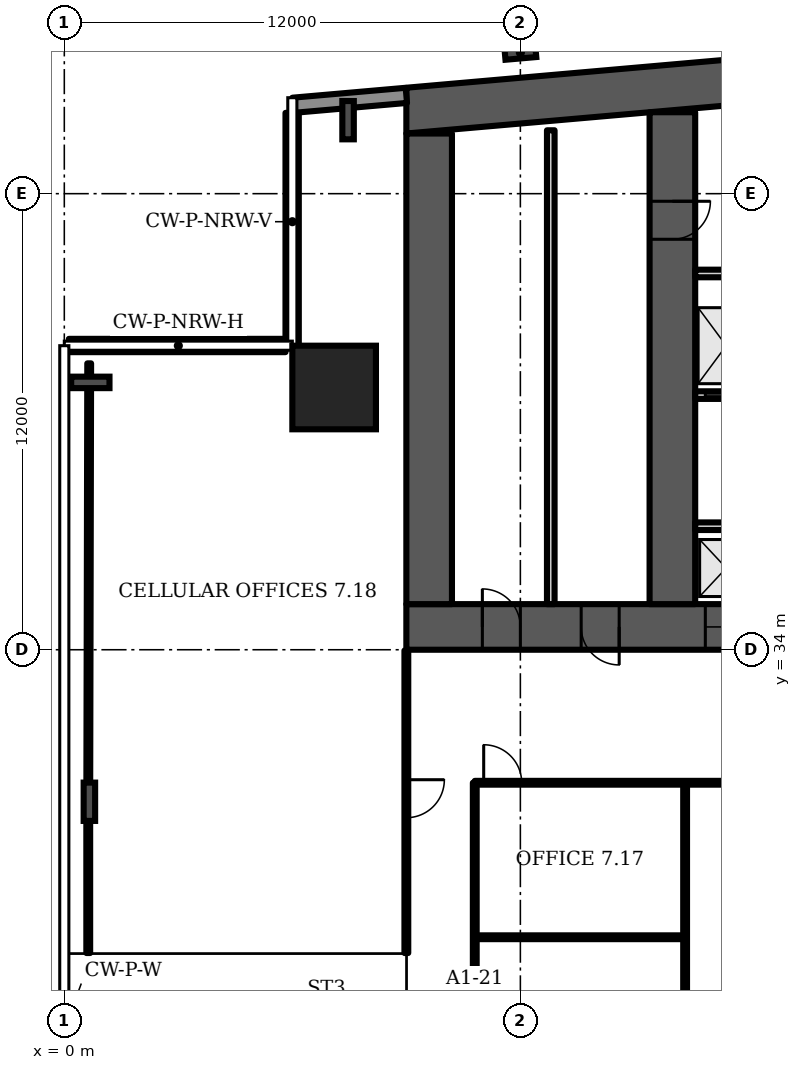
"""IFC4 building model, lengths in metres.
Left out: names, types, materials, properties, quantities, classifications, styles, units other than length and angle.
Written with IfcOpenShell. Run it as: python <this file> out.ifc"""

import sys

from ifc_helpers import new_model, si_unit, direction, frame, frame_2d, origin, origin_2d, place, context, subcontext, project, spatial, polyline, rectangle, i_section, outline, extrude, element, fill, save


model = new_model("IFC4")
c1 = context("Model", 3, precision=1e-05, world=origin(), true_north=direction((0.0, 1.0)))
c2 = subcontext(c1, "Body", "Model", "MODEL_VIEW")
j1 = project(units=[si_unit("LENGTHUNIT", "METRE"), si_unit("PLANEANGLEUNIT", "RADIAN")], contexts=[c1])
p1 = place(None, origin())
s1 = spatial("IfcSite", under=j1, at=p1, CompositionType="ELEMENT")
p2 = place(p1, origin())
s2 = spatial("IfcBuilding", under=s1, at=p2, CompositionType="ELEMENT")
p3 = place(p2, frame((0.0, 0.0, 45.1)))
s3 = spatial("IfcBuildingStorey", under=s2, at=p3, CompositionType="ELEMENT", Elevation=45.1)
p4 = place(p3, frame((0.0, 0.0, -0.0)))
e1 = element("IfcWall", 1, at=p4, inside=s3, PredefinedType="SHEAR", context=c2, shape_type="SweptSolid", body=[
    extrude(outline(polyline([(9.0, 47.583), (37.0, 50.032), (65.0, 47.583), (65.0, 48.787), (37.0, 51.237), (9.0, 48.787), (9.0, 47.583)])), origin(), (0.0, 0.0, 1.0), 3.6),
])
p5 = place(p3, frame((9.0, 34.6, 0.0), z_axis=(0.0, 0.0, 1.0), x_axis=(1.0, 0.0, 0.0)))
e2 = element("IfcWall", 2, at=p5, inside=s3, PredefinedType="SHEAR", context=c2, shape_type="SweptSolid", body=[
    extrude(rectangle(XDim=56.0, YDim=1.2, at=frame_2d((28.0, 0.0))), origin(), (0.0, 0.0, 1.0), 3.6),
])
p6 = place(p5, frame((2.0, 0.0, 0.0)))
e3 = element("IfcOpeningElement", 3, at=p6, cuts=e2, PredefinedType="OPENING", context=c2, shape_type="SweptSolid", body=[
    extrude(rectangle(XDim=1.0, YDim=2.1, at=frame_2d((0.5, 1.05))), frame((0.0, 0.61, 0.0), z_axis=(0.0, -1.0, 0.0), x_axis=(1.0, 0.0, 0.0)), (0.0, 0.0, 1.0), 1.22),
])
p7 = place(p5, frame((4.6, 0.0, 0.0)))
e4 = element("IfcOpeningElement", 4, at=p7, cuts=e2, PredefinedType="OPENING", context=c2, shape_type="SweptSolid", body=[
    extrude(rectangle(XDim=1.0, YDim=2.1, at=frame_2d((0.5, 1.05))), frame((0.0, 0.61, 0.0), z_axis=(0.0, -1.0, 0.0), x_axis=(1.0, 0.0, 0.0)), (0.0, 0.0, 1.0), 1.22),
])
p8 = place(p5, frame((7.867, 0.0, 0.0)))
e5 = element("IfcOpeningElement", 5, at=p8, cuts=e2, PredefinedType="OPENING", context=c2, shape_type="SweptSolid", body=[
    extrude(rectangle(XDim=1.1, YDim=2.1, at=frame_2d((0.55, 1.05))), frame((0.0, 0.61, 0.0), z_axis=(0.0, -1.0, 0.0), x_axis=(1.0, 0.0, 0.0)), (0.0, 0.0, 1.0), 1.22),
])
p9 = place(p5, frame((12.033, 0.0, 0.0)))
e6 = element("IfcOpeningElement", 6, at=p9, cuts=e2, PredefinedType="OPENING", context=c2, shape_type="SweptSolid", body=[
    extrude(rectangle(XDim=1.1, YDim=2.1, at=frame_2d((0.55, 1.05))), frame((0.0, 0.61, 0.0), z_axis=(0.0, -1.0, 0.0), x_axis=(1.0, 0.0, 0.0)), (0.0, 0.0, 1.0), 1.22),
])
p10 = place(p5, frame((9.8, 0.0, 0.0)))
e7 = element("IfcOpeningElement", 7, at=p10, cuts=e2, PredefinedType="OPENING", context=c2, shape_type="SweptSolid", body=[
    extrude(rectangle(XDim=1.4, YDim=2.1, at=frame_2d((0.7, 1.05))), frame((0.0, 0.61, 0.0), z_axis=(0.0, -1.0, 0.0), x_axis=(1.0, 0.0, 0.0)), (0.0, 0.0, 1.0), 1.22),
])
p11 = place(p5, frame((14.65, 0.0, 0.0)))
e8 = element("IfcOpeningElement", 8, at=p11, cuts=e2, PredefinedType="OPENING", context=c2, shape_type="SweptSolid", body=[
    extrude(rectangle(XDim=1.2, YDim=2.1, at=frame_2d((0.6, 1.05))), frame((0.0, 0.61, 0.0), z_axis=(0.0, -1.0, 0.0), x_axis=(1.0, 0.0, 0.0)), (0.0, 0.0, 1.0), 1.22),
])
p12 = place(p5, frame((21.867, 0.0, 0.0)))
e9 = element("IfcOpeningElement", 9, at=p12, cuts=e2, PredefinedType="OPENING", context=c2, shape_type="SweptSolid", body=[
    extrude(rectangle(XDim=1.1, YDim=2.1, at=frame_2d((0.55, 1.05))), frame((0.0, 0.61, 0.0), z_axis=(0.0, -1.0, 0.0), x_axis=(1.0, 0.0, 0.0)), (0.0, 0.0, 1.0), 1.22),
])
p13 = place(p5, frame((26.033, 0.0, 0.0)))
e10 = element("IfcOpeningElement", 10, at=p13, cuts=e2, PredefinedType="OPENING", context=c2, shape_type="SweptSolid", body=[
    extrude(rectangle(XDim=1.1, YDim=2.1, at=frame_2d((0.55, 1.05))), frame((0.0, 0.61, 0.0), z_axis=(0.0, -1.0, 0.0), x_axis=(1.0, 0.0, 0.0)), (0.0, 0.0, 1.0), 1.22),
])
p14 = place(p5, frame((23.8, 0.0, 0.0)))
e11 = element("IfcOpeningElement", 11, at=p14, cuts=e2, PredefinedType="OPENING", context=c2, shape_type="SweptSolid", body=[
    extrude(rectangle(XDim=1.4, YDim=2.1, at=frame_2d((0.7, 1.05))), frame((0.0, 0.61, 0.0), z_axis=(0.0, -1.0, 0.0), x_axis=(1.0, 0.0, 0.0)), (0.0, 0.0, 1.0), 1.22),
])
p15 = place(p5, frame((28.867, 0.0, 0.0)))
e12 = element("IfcOpeningElement", 12, at=p15, cuts=e2, PredefinedType="OPENING", context=c2, shape_type="SweptSolid", body=[
    extrude(rectangle(XDim=1.1, YDim=2.1, at=frame_2d((0.55, 1.05))), frame((0.0, 0.61, 0.0), z_axis=(0.0, -1.0, 0.0), x_axis=(1.0, 0.0, 0.0)), (0.0, 0.0, 1.0), 1.22),
])
p16 = place(p5, frame((33.033, 0.0, 0.0)))
e13 = element("IfcOpeningElement", 13, at=p16, cuts=e2, PredefinedType="OPENING", context=c2, shape_type="SweptSolid", body=[
    extrude(rectangle(XDim=1.1, YDim=2.1, at=frame_2d((0.55, 1.05))), frame((0.0, 0.61, 0.0), z_axis=(0.0, -1.0, 0.0), x_axis=(1.0, 0.0, 0.0)), (0.0, 0.0, 1.0), 1.22),
])
p17 = place(p5, frame((40.15, 0.0, 0.0)))
e14 = element("IfcOpeningElement", 14, at=p17, cuts=e2, PredefinedType="OPENING", context=c2, shape_type="SweptSolid", body=[
    extrude(rectangle(XDim=1.2, YDim=2.1, at=frame_2d((0.6, 1.05))), frame((0.0, 0.61, 0.0), z_axis=(0.0, -1.0, 0.0), x_axis=(1.0, 0.0, 0.0)), (0.0, 0.0, 1.0), 1.22),
])
p18 = place(p5, frame((44.8, 0.0, 0.0)))
e15 = element("IfcOpeningElement", 15, at=p18, cuts=e2, PredefinedType="OPENING", context=c2, shape_type="SweptSolid", body=[
    extrude(rectangle(XDim=1.4, YDim=2.1, at=frame_2d((0.7, 1.05))), frame((0.0, 0.61, 0.0), z_axis=(0.0, -1.0, 0.0), x_axis=(1.0, 0.0, 0.0)), (0.0, 0.0, 1.0), 1.22),
])
p19 = place(p5, frame((49.867, 0.0, 0.0)))
e16 = element("IfcOpeningElement", 16, at=p19, cuts=e2, PredefinedType="OPENING", context=c2, shape_type="SweptSolid", body=[
    extrude(rectangle(XDim=1.1, YDim=2.1, at=frame_2d((0.55, 1.05))), frame((0.0, 0.61, 0.0), z_axis=(0.0, -1.0, 0.0), x_axis=(1.0, 0.0, 0.0)), (0.0, 0.0, 1.0), 1.22),
])
p20 = place(p5, frame((53.5, 0.0, 0.0)))
e17 = element("IfcOpeningElement", 17, at=p20, cuts=e2, PredefinedType="OPENING", context=c2, shape_type="SweptSolid", body=[
    extrude(rectangle(XDim=1.1, YDim=2.1, at=frame_2d((0.55, 1.05))), frame((0.0, 0.61, 0.0), z_axis=(0.0, -1.0, 0.0), x_axis=(1.0, 0.0, 0.0)), (0.0, 0.0, 1.0), 1.22),
])
p21 = place(p5, frame((51.567, 0.0, 0.0)))
e18 = element("IfcOpeningElement", 18, at=p21, cuts=e2, PredefinedType="OPENING", context=c2, shape_type="SweptSolid", body=[
    extrude(rectangle(XDim=1.4, YDim=2.1, at=frame_2d((0.7, 1.05))), frame((0.0, 0.61, 0.0), z_axis=(0.0, -1.0, 0.0), x_axis=(1.0, 0.0, 0.0)), (0.0, 0.0, 1.0), 1.22),
])
p22 = place(p3, frame((9.6, 35.2, 0.0), z_axis=(0.0, 0.0, 1.0), x_axis=(0.0, 1.0, 0.0)))
e19 = element("IfcWall", 19, at=p22, inside=s3, PredefinedType="SHEAR", context=c2, shape_type="SweptSolid", body=[
    extrude(rectangle(XDim=12.383, YDim=1.2, at=frame_2d((6.191, 0.0))), origin(), (0.0, 0.0, 1.0), 3.6),
])
p23 = place(p3, frame((16.0, 35.2, 0.0), z_axis=(0.0, 0.0, 1.0), x_axis=(0.0, 1.0, 0.0)))
e20 = element("IfcWall", 20, at=p23, inside=s3, PredefinedType="SHEAR", context=c2, shape_type="SweptSolid", body=[
    extrude(rectangle(XDim=12.943, YDim=1.2, at=frame_2d((6.471, 0.0))), origin(), (0.0, 0.0, 1.0), 3.6),
])
p24 = place(p23, frame((9.6, 0.0, 0.0)))
e21 = element("IfcOpeningElement", 21, at=p24, cuts=e20, PredefinedType="OPENING", context=c2, shape_type="SweptSolid", body=[
    extrude(rectangle(XDim=1.0, YDim=2.1, at=frame_2d((0.5, 1.05))), frame((0.0, 0.61, 0.0), z_axis=(0.0, -1.0, 0.0), x_axis=(1.0, 0.0, 0.0)), (0.0, 0.0, 1.0), 1.22),
])
p25 = place(p3, frame((7.1, 40.9, 0.0), z_axis=(0.0, 0.0, 1.0), x_axis=(1.0, 0.0, 0.0)))
e22 = element("IfcColumn", 22, at=p25, inside=s3, PredefinedType="COLUMN", context=c2, shape_type="SweptSolid", body=[
    extrude(rectangle(XDim=2.2, YDim=2.2, at=origin_2d()), origin(), (0.0, 0.0, 1.0), 3.6),
])
for number, where, z_axis, x_axis in (
    (23, (7.467, 47.934, 0.0), (0.0, 0.0, 1.0), (-1.0, 0.0, 0.0)),
    (24, (0.685, 41.034, 0.0), (0.0, 0.0, 1.0), (0.0, 1.0, 0.0)),
    (25, (0.66, 30.0, 0.0), (0.0, 0.0, 1.0), (-1.0, 0.0, 0.0)),
):
    element("IfcColumn", number, at=place(p3, frame(where, z_axis=z_axis, x_axis=x_axis)), inside=s3, PredefinedType="COLUMN", context=c2, shape_type="SweptSolid", body=[
        extrude(i_section(OverallWidth=0.302, OverallDepth=1.008, WebThickness=0.021, FlangeThickness=0.04, FilletRadius=0.03, at=origin_2d()), origin(), (0.0, 0.0, 1.0), 3.6),
    ])
p26 = place(p3, frame((12.0, 49.71, 0.0), z_axis=(0.0, 0.0, 1.0), x_axis=(-0.087156, 0.996197, 0.0)))
e26 = element("IfcColumn", 26, at=p26, inside=s3, PredefinedType="COLUMN", context=c2, shape_type="SweptSolid", body=[
    extrude(i_section(OverallWidth=0.303, OverallDepth=0.814, WebThickness=0.021, FlangeThickness=0.04, FilletRadius=0.03, at=origin_2d()), origin(), (0.0, 0.0, 1.0), 3.6),
])
p27 = place(p3, frame((9.0, 48.587, 0.0), z_axis=(0.0, 0.0, 1.0), x_axis=(-0.996194, -0.087168, 0.0)))
e27 = element("IfcWall", 27, at=p27, inside=s3, PredefinedType="SOLIDWALL", context=c2, shape_type="SweptSolid", body=[
    extrude(rectangle(XDim=2.994, YDim=0.4, at=frame_2d((1.497, 0.0))), origin(), (0.0, 0.0, 1.0), 3.2),
])
p28 = place(p3, frame((5.995, 48.126, 0.0), z_axis=(0.0, 0.0, 1.0), x_axis=(0.0, -1.0, 0.0)))
e28 = element("IfcWall", 28, at=p28, inside=s3, PredefinedType="SOLIDWALL", context=c2, shape_type="SweptSolid", body=[
    extrude(rectangle(XDim=6.126, YDim=0.35, at=frame_2d((3.063, 0.0))), origin(), (0.0, 0.0, 1.0), 1.0),
])
p29 = place(p3, frame((5.82, 42.005, 0.0), z_axis=(0.0, 0.0, 1.0), x_axis=(-1.0, 0.0, 0.0)))
e29 = element("IfcWall", 29, at=p29, inside=s3, PredefinedType="SOLIDWALL", context=c2, shape_type="SweptSolid", body=[
    extrude(rectangle(XDim=5.7, YDim=0.35, at=frame_2d((2.85, 0.0))), origin(), (0.0, 0.0, 1.0), 1.0),
])
p30 = place(p3, frame((12.8, 35.2, 0.0), z_axis=(0.0, 0.0, 1.0), x_axis=(0.0, 1.0, 0.0)))
e30 = element("IfcWall", 30, at=p30, inside=s3, PredefinedType="PARTITIONING", context=c2, shape_type="SweptSolid", body=[
    extrude(rectangle(XDim=12.468, YDim=0.2, at=frame_2d((6.234, 0.0))), origin(), (0.0, 0.0, 1.0), 3.2),
])
p31 = place(p3, frame((16.6, 40.7, 0.0), z_axis=(0.0, 0.0, 1.0), x_axis=(1.0, 0.0, 0.0)))
e31 = element("IfcWall", 31, at=p31, inside=s3, PredefinedType="PARTITIONING", context=c2, shape_type="SweptSolid", body=[
    extrude(rectangle(XDim=5.8, YDim=0.2, at=frame_2d((2.9, 0.0))), origin(), (0.0, 0.0, 1.0), 3.2),
])
p32 = place(p31, frame((0.267, 0.0, 0.0)))
e32 = element("IfcOpeningElement", 32, at=p32, cuts=e31, PredefinedType="OPENING", context=c2, shape_type="SweptSolid", body=[
    extrude(rectangle(XDim=1.1, YDim=2.1, at=frame_2d((0.55, 1.05))), frame((0.0, 0.11, 0.0), z_axis=(0.0, -1.0, 0.0), x_axis=(1.0, 0.0, 0.0)), (0.0, 0.0, 1.0), 0.22),
])
p33 = place(p31, frame((2.35, 0.0, 0.0)))
e33 = element("IfcOpeningElement", 33, at=p33, cuts=e31, PredefinedType="OPENING", context=c2, shape_type="SweptSolid", body=[
    extrude(rectangle(XDim=1.1, YDim=2.1, at=frame_2d((0.55, 1.05))), frame((0.0, 0.11, 0.0), z_axis=(0.0, -1.0, 0.0), x_axis=(1.0, 0.0, 0.0)), (0.0, 0.0, 1.0), 0.22),
])
p34 = place(p31, frame((4.433, 0.0, 0.0)))
e34 = element("IfcOpeningElement", 34, at=p34, cuts=e31, PredefinedType="OPENING", context=c2, shape_type="SweptSolid", body=[
    extrude(rectangle(XDim=1.1, YDim=2.1, at=frame_2d((0.55, 1.05))), frame((0.0, 0.11, 0.0), z_axis=(0.0, -1.0, 0.0), x_axis=(1.0, 0.0, 0.0)), (0.0, 0.0, 1.0), 0.22),
])
p35 = place(p3, frame((0.0, 0.0, -0.0)))
e35 = element("IfcWall", 35, at=p35, inside=s3, PredefinedType="PARTITIONING", context=c2, shape_type="SweptSolid", body=[
    extrude(outline(polyline([(18.233, 37.15), (16.6, 37.15), (16.6, 37.35), (18.233, 37.35), (18.433, 37.35), (18.433, 35.2), (18.233, 35.2), (18.233, 37.15)])), origin(), (0.0, 0.0, 1.0), 3.2),
])
p36 = place(p3, frame((0.0, 0.0, -0.0)))
e36 = element("IfcWall", 36, at=p36, inside=s3, PredefinedType="PARTITIONING", context=c2, shape_type="SweptSolid", body=[
    extrude(outline(polyline([(18.433, 40.8), (18.233, 40.8), (18.233, 43.8), (16.6, 43.8), (16.6, 44.0), (22.4, 44.0), (22.4, 43.8), (20.767, 43.8), (20.767, 40.8), (20.567, 40.8), (20.567, 43.8), (18.433, 43.8), (18.433, 40.8)])), origin(), (0.0, 0.0, 1.0), 3.2),
])
p37 = place(p3, frame((0.63, 26.02, 0.0), z_axis=(0.0, 0.0, 1.0), x_axis=(0.0, 1.0, 0.0)))
e37 = element("IfcWall", 37, at=p37, inside=s3, PredefinedType="PARTITIONING", context=c2, shape_type="SweptSolid", body=[
    extrude(rectangle(XDim=3.98, YDim=0.1, at=frame_2d((1.99, 0.0))), origin(), (0.0, 0.0, 1.0), 2.58),
])
p38 = place(p3, frame((0.63, 30.0, 0.0), z_axis=(0.0, 0.0, 1.0), x_axis=(0.00218, 0.999994, 0.0)))
e38 = element("IfcWall", 38, at=p38, inside=s3, PredefinedType="PARTITIONING", context=c2, shape_type="SweptSolid", body=[
    extrude(rectangle(XDim=11.535, YDim=0.1, at=frame_2d((5.768, 0.0))), origin(), (0.0, 0.0, 1.0), 2.58),
])
p39 = place(p3, frame((9.0, 26.02, 0.0), z_axis=(0.0, 0.0, 1.0), x_axis=(0.0, 1.0, 0.0)))
e39 = element("IfcWall", 39, at=p39, inside=s3, PredefinedType="PARTITIONING", context=c2, shape_type="SweptSolid", body=[
    extrude(rectangle(XDim=7.96, YDim=0.1, at=frame_2d((3.98, 0.0))), origin(), (0.0, 0.0, 1.0), 3.2),
])
p40 = place(p39, frame((3.56, 0.0, 0.0)))
e40 = element("IfcOpeningElement", 40, at=p40, cuts=e39, PredefinedType="OPENING", context=c2, shape_type="SweptSolid", body=[
    extrude(rectangle(XDim=1.0, YDim=2.1, at=frame_2d((0.5, 1.05))), frame((0.0, 0.06, 0.0), z_axis=(0.0, -1.0, 0.0), x_axis=(1.0, 0.0, 0.0)), (0.0, 0.0, 1.0), 0.12),
])
p41 = place(p3, frame((10.8, 23.55, 0.0), z_axis=(0.0, 0.0, 1.0), x_axis=(0.0, 1.0, 0.0)))
e41 = element("IfcWall", 41, at=p41, inside=s3, PredefinedType="PARTITIONING", context=c2, shape_type="SweptSolid", body=[
    extrude(rectangle(XDim=6.95, YDim=0.1, at=frame_2d((3.475, 0.0))), origin(), (0.0, 0.0, 1.0), 3.2),
])
p42 = place(p41, frame((0.308, 0.0, 0.0)))
e42 = element("IfcOpeningElement", 42, at=p42, cuts=e41, PredefinedType="OPENING", context=c2, shape_type="SweptSolid", body=[
    extrude(rectangle(XDim=1.0, YDim=2.1, at=frame_2d((0.5, 1.05))), frame((0.0, 0.06, 0.0), z_axis=(0.0, -1.0, 0.0), x_axis=(1.0, 0.0, 0.0)), (0.0, 0.0, 1.0), 0.12),
])
p43 = place(p3, frame((10.8, 26.435, 0.0), z_axis=(0.0, 0.0, 1.0), x_axis=(1.0, 0.0, 0.0)))
e43 = element("IfcWall", 43, at=p43, inside=s3, PredefinedType="PARTITIONING", context=c2, shape_type="SweptSolid", body=[
    extrude(rectangle(XDim=5.535, YDim=0.1, at=frame_2d((2.768, 0.0))), origin(), (0.0, 0.0, 1.0), 3.2),
])
p44 = place(p3, frame((10.8, 30.5, 0.0), z_axis=(0.0, 0.0, 1.0), x_axis=(1.0, 0.0, 0.0)))
e44 = element("IfcWall", 44, at=p44, inside=s3, PredefinedType="PARTITIONING", context=c2, shape_type="SweptSolid", body=[
    extrude(rectangle(XDim=26.05, YDim=0.1, at=frame_2d((13.025, 0.0))), origin(), (0.0, 0.0, 1.0), 3.2),
])
p45 = place(p44, frame((0.235, 0.0, 0.0)))
e45 = element("IfcOpeningElement", 45, at=p45, cuts=e44, PredefinedType="OPENING", context=c2, shape_type="SweptSolid", body=[
    extrude(rectangle(XDim=1.0, YDim=2.1, at=frame_2d((0.5, 1.05))), frame((0.0, 0.06, 0.0), z_axis=(0.0, -1.0, 0.0), x_axis=(1.0, 0.0, 0.0)), (0.0, 0.0, 1.0), 0.12),
])
p46 = place(p44, frame((10.955, 0.0, 0.0)))
e46 = element("IfcOpeningElement", 46, at=p46, cuts=e44, PredefinedType="OPENING", context=c2, shape_type="SweptSolid", body=[
    extrude(rectangle(XDim=1.0, YDim=2.1, at=frame_2d((0.5, 1.05))), frame((0.0, 0.06, 0.0), z_axis=(0.0, -1.0, 0.0), x_axis=(1.0, 0.0, 0.0)), (0.0, 0.0, 1.0), 0.12),
])
p47 = place(p3, frame((16.335, 14.24, 0.0), z_axis=(0.0, 0.0, 1.0), x_axis=(0.0, 1.0, 0.0)))
e47 = element("IfcWall", 47, at=p47, inside=s3, PredefinedType="PARTITIONING", context=c2, shape_type="SweptSolid", body=[
    extrude(rectangle(XDim=16.26, YDim=0.1, at=frame_2d((8.13, 0.0))), origin(), (0.0, 0.0, 1.0), 3.2),
])
p48 = place(p6, origin())
e48 = element("IfcDoor", 48, at=p48, inside=s3, OperationType="SINGLE_SWING_LEFT", PredefinedType="DOOR", context=c2, shape_type="SweptSolid", body=[
    extrude(rectangle(XDim=1.0, YDim=2.1, at=frame_2d((0.5, 1.05))), frame((0.0, 0.6, 0.0), z_axis=(0.0, -1.0, 0.0), x_axis=(1.0, 0.0, 0.0)), (0.0, 0.0, 1.0), 1.199),
])
fill(e3, e48)
p49 = place(p7, origin())
e49 = element("IfcDoor", 49, at=p49, inside=s3, OperationType="SINGLE_SWING_RIGHT", PredefinedType="DOOR", context=c2, shape_type="SweptSolid", body=[
    extrude(rectangle(XDim=1.0, YDim=2.1, at=frame_2d((0.5, 1.05))), frame((0.0, 0.6, 0.0), z_axis=(0.0, -1.0, 0.0), x_axis=(1.0, 0.0, 0.0)), (0.0, 0.0, 1.0), 1.199),
])
fill(e4, e49)
p50 = place(p8, origin())
e50 = element("IfcDoor", 50, at=p50, inside=s3, OperationType="DOUBLE_DOOR_SLIDING", PredefinedType="DOOR", context=c2, shape_type="SweptSolid", body=[
    extrude(rectangle(XDim=1.1, YDim=2.1, at=frame_2d((0.55, 1.05))), frame((0.0, 0.025, 0.0), z_axis=(0.0, -1.0, 0.0), x_axis=(1.0, 0.0, 0.0)), (0.0, 0.0, 1.0), 0.05),
])
fill(e5, e50)
p51 = place(p32, origin())
e51 = element("IfcDoor", 51, at=p51, inside=s3, OperationType="DOUBLE_DOOR_SLIDING", PredefinedType="DOOR", context=c2, shape_type="SweptSolid", body=[
    extrude(rectangle(XDim=1.1, YDim=2.1, at=frame_2d((0.55, 1.05))), frame((0.0, 0.025, 0.0), z_axis=(0.0, -1.0, 0.0), x_axis=(1.0, 0.0, 0.0)), (0.0, 0.0, 1.0), 0.05),
])
fill(e32, e51)
p52 = place(p24, origin())
e52 = element("IfcDoor", 52, at=p52, inside=s3, OperationType="SINGLE_SWING_RIGHT", PredefinedType="DOOR", context=c2, shape_type="SweptSolid", body=[
    extrude(rectangle(XDim=1.0, YDim=2.1, at=frame_2d((0.5, 1.05))), frame((0.0, 0.6, 0.0), z_axis=(0.0, -1.0, 0.0), x_axis=(1.0, 0.0, 0.0)), (0.0, 0.0, 1.0), 1.199),
])
fill(e21, e52)
p53 = place(p40, origin())
e53 = element("IfcDoor", 53, at=p53, inside=s3, OperationType="SINGLE_SWING_RIGHT", PredefinedType="DOOR", context=c2, shape_type="SweptSolid", body=[
    extrude(rectangle(XDim=1.0, YDim=2.1, at=frame_2d((0.5, 1.05))), frame((0.0, 0.025, 0.0), z_axis=(0.0, -1.0, 0.0), x_axis=(1.0, 0.0, 0.0)), (0.0, 0.0, 1.0), 0.05),
])
fill(e40, e53)
p54 = place(p45, origin())
e54 = element("IfcDoor", 54, at=p54, inside=s3, OperationType="SINGLE_SWING_LEFT", PredefinedType="DOOR", context=c2, shape_type="SweptSolid", body=[
    extrude(rectangle(XDim=1.0, YDim=2.1, at=frame_2d((0.5, 1.05))), frame((0.0, 0.025, 0.0), z_axis=(0.0, -1.0, 0.0), x_axis=(1.0, 0.0, 0.0)), (0.0, 0.0, 1.0), 0.05),
])
fill(e45, e54)
save(model, sys.argv[1])
